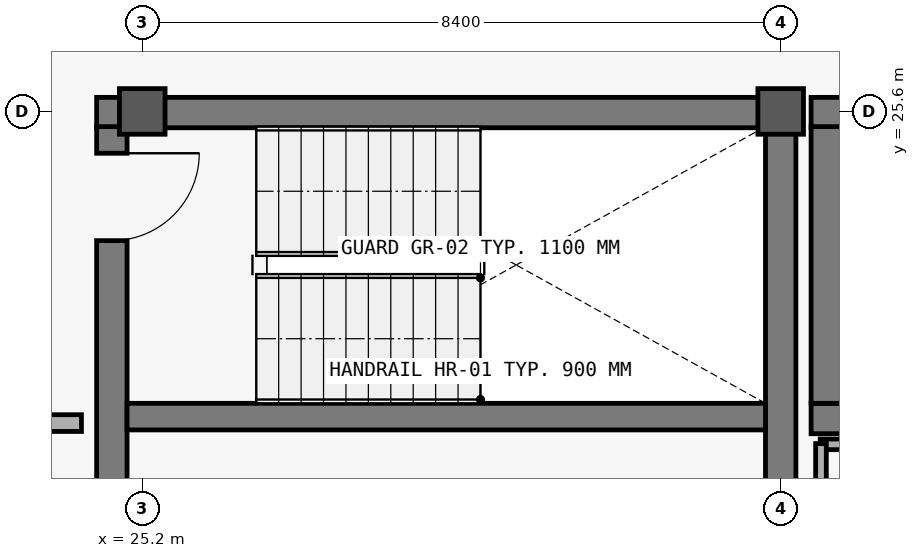
"""IFC4 building model, lengths in metres.
Left out: names, types, materials, properties, quantities, classifications, styles, units other than length and angle.
Written with IfcOpenShell. Run it as: python <this file> out.ifc"""

import sys

from ifc_helpers import new_model, si_unit, direction, frame, frame_2d, origin, origin_2d, place, context, subcontext, project, spatial, rectangle, extrude, element, fill, save


model = new_model("IFC4")
c1 = context("Model", 3, precision=1e-05, world=origin(), true_north=direction((0.0, 1.0)))
c2 = subcontext(c1, "Body", "Model", "MODEL_VIEW")
j1 = project(units=[si_unit("LENGTHUNIT", "METRE"), si_unit("PLANEANGLEUNIT", "RADIAN")], contexts=[c1])
p1 = place(None, origin())
s1 = spatial("IfcSite", under=j1, at=p1, CompositionType="ELEMENT")
p2 = place(p1, origin())
s2 = spatial("IfcBuilding", under=s1, at=p2, CompositionType="ELEMENT")
p3 = place(p2, frame((0.0, 0.0, 37.2)))
s3 = spatial("IfcBuildingStorey", under=s2, at=p3, CompositionType="ELEMENT", Elevation=37.2)
for number, where, z_axis, x_axis in (
    (1, (25.2, 25.6, 0.0), (0.0, 0.0, 1.0), (1.0, 0.0, 0.0)),
    (2, (33.6, 25.6, 0.0), (0.0, 0.0, 1.0), (1.0, 0.0, 0.0)),
):
    element("IfcColumn", number, at=place(p3, frame(where, z_axis=z_axis, x_axis=x_axis)), inside=s3, PredefinedType="COLUMN", context=c2, shape_type="SweptSolid", body=[
        extrude(rectangle(XDim=0.6, YDim=0.6, at=origin_2d()), origin(), (0.0, 0.0, 1.0), 3.6),
    ])
p4 = place(p3, frame((33.8, 25.585, 0.0), z_axis=(0.0, 0.0, 1.0), x_axis=(-1.0, 0.0, 0.0)))
e3 = element("IfcWall", 3, at=p4, inside=s3, PredefinedType="SHEAR", context=c2, shape_type="SweptSolid", body=[
    extrude(rectangle(XDim=9.2, YDim=0.4, at=frame_2d((4.6, 0.0))), origin(), (0.0, 0.0, 1.0), 3.32),
])
p5 = place(p3, frame((24.8, 25.4, 0.0), z_axis=(0.0, 0.0, 1.0), x_axis=(0.0, -1.0, 0.0)))
e4 = element("IfcWall", 4, at=p5, inside=s3, PredefinedType="SHEAR", context=c2, shape_type="SweptSolid", body=[
    extrude(rectangle(XDim=7.4, YDim=0.4, at=frame_2d((3.7, 0.0))), origin(), (0.0, 0.0, 1.0), 3.32),
])
p6 = place(p5, frame((0.35, 0.0, 0.0)))
e5 = element("IfcOpeningElement", 5, at=p6, cuts=e4, PredefinedType="OPENING", context=c2, shape_type="SweptSolid", body=[
    extrude(rectangle(XDim=1.15, YDim=2.2, at=frame_2d((0.575, 1.1))), frame((0.0, 0.21, 0.0), z_axis=(0.0, -1.0, 0.0), x_axis=(1.0, 0.0, 0.0)), (0.0, 0.0, 1.0), 0.42),
])
p7 = place(p3, frame((33.6, 18.0, 0.0), z_axis=(0.0, 0.0, 1.0), x_axis=(0.0, 1.0, 0.0)))
e6 = element("IfcWall", 6, at=p7, inside=s3, PredefinedType="SHEAR", context=c2, shape_type="SweptSolid", body=[
    extrude(rectangle(XDim=7.4, YDim=0.4, at=frame_2d((3.7, 0.0))), origin(), (0.0, 0.0, 1.0), 3.32),
])
p8 = place(p3, frame((25.0, 21.585, 0.0), z_axis=(0.0, 0.0, 1.0), x_axis=(1.0, 0.0, 0.0)))
e7 = element("IfcWall", 7, at=p8, inside=s3, PredefinedType="SHEAR", context=c2, shape_type="SweptSolid", body=[
    extrude(rectangle(XDim=8.4, YDim=0.35, at=frame_2d((4.2, 0.0))), origin(), (0.0, 0.0, 1.0), 3.32),
])
p9 = place(p3, frame((19.6, 21.5, 0.0), z_axis=(0.0, 0.0, 1.0), x_axis=(1.0, 0.0, 0.0)))
e8 = element("IfcWall", 8, at=p9, inside=s3, PredefinedType="SOLIDWALL", context=c2, shape_type="SweptSolid", body=[
    extrude(rectangle(XDim=4.8, YDim=0.22, at=frame_2d((2.4, 0.0))), origin(), (0.0, 0.0, 1.0), 2.47),
])
p10 = place(p9, frame((2.05, 0.0, 0.0)))
e9 = element("IfcOpeningElement", 9, at=p10, cuts=e8, PredefinedType="OPENING", context=c2, shape_type="SweptSolid", body=[
    extrude(rectangle(XDim=1.25, YDim=2.2, at=frame_2d((0.625, 1.1))), frame((0.0, 0.12, 0.0), z_axis=(0.0, -1.0, 0.0), x_axis=(1.0, 0.0, 0.0)), (0.0, 0.0, 1.0), 0.24),
])
for number, where, z_axis, x_axis in (
    (10, (34.0, 21.56, 0.0), (0.0, 0.0, 1.0), (1.0, 0.0, 0.0)),
    (11, (43.1, 25.585, 0.0), (0.0, 0.0, 1.0), (-1.0, 0.0, 0.0)),
):
    element("IfcWall", number, at=place(p3, frame(where, z_axis=z_axis, x_axis=x_axis)), inside=s3, PredefinedType="SHEAR", context=c2, shape_type="SweptSolid", body=[
        extrude(rectangle(XDim=9.1, YDim=0.4, at=frame_2d((4.55, 0.0))), origin(), (0.0, 0.0, 1.0), 3.32),
    ])
p11 = place(p3, frame((34.2, 25.4, 0.0), z_axis=(0.0, 0.0, 1.0), x_axis=(0.0, -1.0, 0.0)))
e12 = element("IfcWall", 12, at=p11, inside=s3, PredefinedType="SHEAR", context=c2, shape_type="SweptSolid", body=[
    extrude(rectangle(XDim=3.64, YDim=0.4, at=frame_2d((1.82, 0.0))), origin(), (0.0, 0.0, 1.0), 3.32),
])
p12 = place(p3, frame((34.12, 21.22, 0.0), z_axis=(0.0, 0.0, 1.0), x_axis=(1.0, 0.0, 0.0)))
e13 = element("IfcWall", 13, at=p12, inside=s3, PredefinedType="PARTITIONING", context=c2, shape_type="SweptSolid", body=[
    extrude(rectangle(XDim=10.76, YDim=0.14, at=frame_2d((5.38, 0.0))), origin(), (0.0, 0.0, 1.0), 2.48),
])
p13 = place(p3, frame((34.13, 17.77, 0.0), z_axis=(0.0, 0.0, 1.0), x_axis=(0.0, 1.0, 0.0)))
e14 = element("IfcWall", 14, at=p13, inside=s3, PredefinedType="PARTITIONING", context=c2, shape_type="SweptSolid", body=[
    extrude(rectangle(XDim=3.46, YDim=0.14, at=frame_2d((1.73, 0.0))), origin(), (0.0, 0.0, 1.0), 2.48),
])
p14 = place(p6, origin())
e15 = element("IfcDoor", 15, at=p14, inside=s3, OperationType="SINGLE_SWING_LEFT", PredefinedType="DOOR", context=c2, shape_type="SweptSolid", body=[
    extrude(rectangle(XDim=1.15, YDim=2.2, at=frame_2d((0.575, 1.1))), frame((0.0, 0.025, 0.0), z_axis=(0.0, -1.0, 0.0), x_axis=(1.0, 0.0, 0.0)), (0.0, 0.0, 1.0), 0.05),
])
fill(e5, e15)
save(model, sys.argv[1])
